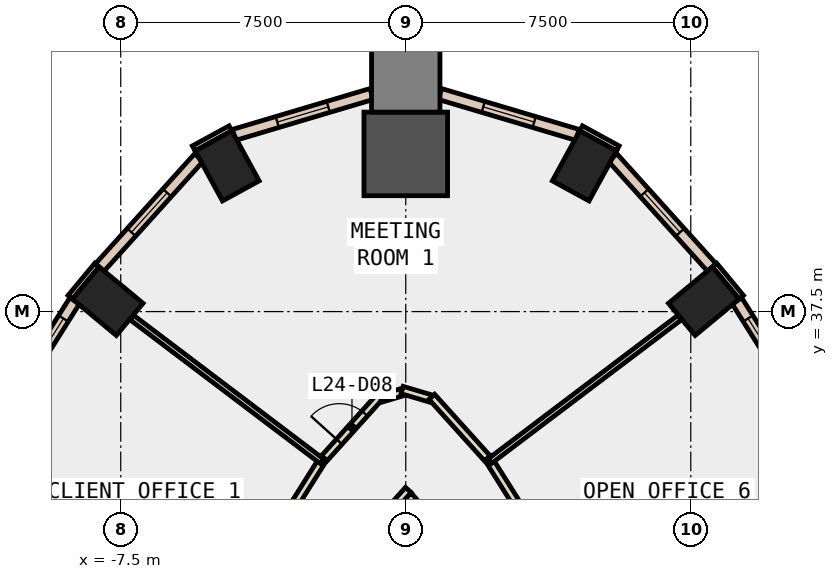
"""IFC4 building model, lengths in metres.
Left out: names, types, materials, properties, quantities, classifications, styles, units other than length and angle.
Written with IfcOpenShell. Run it as: python <this file> out.ifc"""

import sys

from ifc_helpers import new_model, si_unit, direction, frame, frame_2d, origin, origin_2d, place, context, subcontext, project, spatial, rectangle, extrude, element, fill, save


model = new_model("IFC4")
c1 = context("Model", 3, precision=1e-05, world=origin(), true_north=direction((0.0, 1.0)))
c2 = subcontext(c1, "Body", "Model", "MODEL_VIEW")
j1 = project(units=[si_unit("LENGTHUNIT", "METRE"), si_unit("PLANEANGLEUNIT", "RADIAN")], contexts=[c1])
p1 = place(None, origin())
s1 = spatial("IfcSite", under=j1, at=p1, CompositionType="ELEMENT")
p2 = place(p1, origin())
s2 = spatial("IfcBuilding", under=s1, at=p2, CompositionType="ELEMENT")
p3 = place(p2, frame((0.0, 0.0, 111.8)))
s3 = spatial("IfcBuildingStorey", under=s2, at=p3, CompositionType="ELEMENT", Elevation=111.8)
for number, where, z_axis, x_axis in (
    (1, (7.842, 37.774, -0.4), (0.0, 0.0, 1.0), (-0.638, 0.77, 0.0)),
    (2, (4.7, 41.334, -0.4), (0.0, 0.0, 1.0), (-0.877, 0.48, 0.0)),
):
    element("IfcColumn", number, at=place(p3, frame(where, z_axis=z_axis, x_axis=x_axis)), inside=s3, PredefinedType="COLUMN", context=c2, shape_type="SweptSolid", body=[
        extrude(rectangle(XDim=1.1, YDim=1.5, at=origin_2d()), origin(), (0.0, 0.0, 1.0), 4.2),
    ])
p4 = place(p3, frame((0.0, 41.649, -0.4), z_axis=(0.0, 0.0, 1.0), x_axis=(0.0, 1.0, 0.0)))
e3 = element("IfcColumn", 3, at=p4, inside=s3, PredefinedType="COLUMN", context=c2, shape_type="SweptSolid", body=[
    extrude(rectangle(XDim=2.2, YDim=2.2, at=origin_2d()), origin(), (0.0, 0.0, 1.0), 4.2),
])
for number, where, z_axis, x_axis in (
    (4, (-4.7, 41.334, -0.4), (0.0, 0.0, 1.0), (0.877, 0.48, 0.0)),
    (5, (-7.842, 37.774, -0.4), (0.0, 0.0, 1.0), (0.638, 0.77, 0.0)),
):
    element("IfcColumn", number, at=place(p3, frame(where, z_axis=z_axis, x_axis=x_axis)), inside=s3, PredefinedType="COLUMN", context=c2, shape_type="SweptSolid", body=[
        extrude(rectangle(XDim=1.1, YDim=1.5, at=origin_2d()), origin(), (0.0, 0.0, 1.0), 4.2),
    ])
p5 = place(p3, frame((0.0, 43.649, -0.4), z_axis=(0.0, 0.0, 1.0), x_axis=(0.0, 1.0, 0.0)))
e6 = element("IfcColumn", 6, at=p5, inside=s3, PredefinedType="COLUMN", context=c2, shape_type="SweptSolid", body=[
    extrude(rectangle(XDim=1.8, YDim=1.8, at=origin_2d()), origin(), (0.0, 0.0, 1.0), 4.2),
])
for number, where, z_axis, x_axis in (
    (7, (5.579, 41.794, 0.0), (0.0, 0.0, 1.0), (-0.877, 0.48, 0.0)),
    (8, (-4.613, 42.322, 0.0), (0.0, 0.0, 1.0), (-0.877, -0.48, 0.0)),
):
    element("IfcWall", number, at=place(p3, frame(where, z_axis=z_axis, x_axis=x_axis)), inside=s3, PredefinedType="STANDARD", context=c2, shape_type="SweptSolid", body=[
        extrude(rectangle(XDim=1.101, YDim=0.15, at=frame_2d((0.551, 0.0))), origin(), (0.0, 0.0, 1.0), 3.8),
    ])
for number, where, z_axis, x_axis in (
    (9, (8.828, 37.878, 0.0), (0.0, 0.0, 1.0), (-0.638, 0.77, 0.0)),
    (10, (-8.126, 38.724, 0.0), (0.0, 0.0, 1.0), (-0.638, -0.77, 0.0)),
):
    element("IfcWall", number, at=place(p3, frame(where, z_axis=z_axis, x_axis=x_axis)), inside=s3, PredefinedType="STANDARD", context=c2, shape_type="SweptSolid", body=[
        extrude(rectangle(XDim=1.099, YDim=0.15, at=frame_2d((0.55, 0.0))), origin(), (0.0, 0.0, 1.0), 3.8),
    ])
p6 = place(p3, frame((12.018, 32.535, 0.0), z_axis=(0.0, 0.0, 1.0), x_axis=(-0.532699467907, 0.846304482377, 0.0)))
e11 = element("IfcWall", 11, at=p6, inside=s3, PredefinedType="STANDARD", context=c2, shape_type="SweptSolid", body=[
    extrude(rectangle(XDim=6.202, YDim=0.3, at=frame_2d((3.101, 0.0))), origin(), (0.0, 0.0, 1.0), 3.8),
])
p7 = place(p6, frame((0.551, 0.0, 0.9)))
e12 = element("IfcOpeningElement", 12, at=p7, cuts=e11, PredefinedType="OPENING", context=c2, shape_type="SweptSolid", body=[
    extrude(rectangle(XDim=2.0, YDim=2.6, at=frame_2d((1.0, 1.3))), frame((0.0, 0.16, 0.0), z_axis=(0.0, -1.0, 0.0), x_axis=(1.0, 0.0, 0.0)), (0.0, 0.0, 1.0), 0.32),
])
p8 = place(p6, frame((3.652, 0.0, 0.9)))
e13 = element("IfcOpeningElement", 13, at=p8, cuts=e11, PredefinedType="OPENING", context=c2, shape_type="SweptSolid", body=[
    extrude(rectangle(XDim=2.0, YDim=2.6, at=frame_2d((1.0, 1.3))), frame((0.0, 0.16, 0.0), z_axis=(0.0, -1.0, 0.0), x_axis=(1.0, 0.0, 0.0)), (0.0, 0.0, 1.0), 0.32),
])
p9 = place(p3, frame((8.052, 38.661, 0.0), z_axis=(0.0, 0.0, 1.0), x_axis=(-0.66966434159, 0.742663900834, 0.0)))
e14 = element("IfcWall", 14, at=p9, inside=s3, PredefinedType="STANDARD", context=c2, shape_type="SweptSolid", body=[
    extrude(rectangle(XDim=3.893, YDim=0.3, at=frame_2d((1.946, 0.0))), origin(), (0.0, 0.0, 1.0), 3.8),
])
p10 = place(p9, frame((1.246, 0.0, 0.9)))
e15 = element("IfcOpeningElement", 15, at=p10, cuts=e14, PredefinedType="OPENING", context=c2, shape_type="SweptSolid", body=[
    extrude(rectangle(XDim=1.4, YDim=2.6, at=frame_2d((0.7, 1.3))), frame((0.0, 0.16, 0.0), z_axis=(0.0, -1.0, 0.0), x_axis=(1.0, 0.0, 0.0)), (0.0, 0.0, 1.0), 0.32),
])
p11 = place(p3, frame((4.52, 42.149, 0.0), z_axis=(0.0, 0.0, 1.0), x_axis=(-0.958563070772, 0.284880394819, 0.0)))
e16 = element("IfcWall", 16, at=p11, inside=s3, PredefinedType="STANDARD", context=c2, shape_type="SweptSolid", body=[
    extrude(rectangle(XDim=3.778, YDim=0.3, at=frame_2d((1.889, 0.0))), origin(), (0.0, 0.0, 1.0), 3.8),
])
p12 = place(p11, frame((1.189, 0.0, 0.9)))
e17 = element("IfcOpeningElement", 17, at=p12, cuts=e16, PredefinedType="OPENING", context=c2, shape_type="SweptSolid", body=[
    extrude(rectangle(XDim=1.4, YDim=2.6, at=frame_2d((0.7, 1.3))), frame((0.0, 0.16, 0.0), z_axis=(0.0, -1.0, 0.0), x_axis=(1.0, 0.0, 0.0)), (0.0, 0.0, 1.0), 0.32),
])
p13 = place(p3, frame((-0.899, 43.225, 0.0), z_axis=(0.0, 0.0, 1.0), x_axis=(-0.958563070772, -0.284880394819, 0.0)))
e18 = element("IfcWall", 18, at=p13, inside=s3, PredefinedType="STANDARD", context=c2, shape_type="SweptSolid", body=[
    extrude(rectangle(XDim=3.778, YDim=0.3, at=frame_2d((1.889, 0.0))), origin(), (0.0, 0.0, 1.0), 3.8),
])
p14 = place(p13, frame((1.189, 0.0, 0.9)))
e19 = element("IfcOpeningElement", 19, at=p14, cuts=e18, PredefinedType="OPENING", context=c2, shape_type="SweptSolid", body=[
    extrude(rectangle(XDim=1.4, YDim=2.6, at=frame_2d((0.7, 1.3))), frame((0.0, 0.16, 0.0), z_axis=(0.0, -1.0, 0.0), x_axis=(1.0, 0.0, 0.0)), (0.0, 0.0, 1.0), 0.32),
])
p15 = place(p3, frame((-5.445, 41.552, 0.0), z_axis=(0.0, 0.0, 1.0), x_axis=(-0.66966434159, -0.742663900834, 0.0)))
e20 = element("IfcWall", 20, at=p15, inside=s3, PredefinedType="STANDARD", context=c2, shape_type="SweptSolid", body=[
    extrude(rectangle(XDim=3.893, YDim=0.3, at=frame_2d((1.946, 0.0))), origin(), (0.0, 0.0, 1.0), 3.8),
])
p16 = place(p15, frame((1.246, 0.0, 0.9)))
e21 = element("IfcOpeningElement", 21, at=p16, cuts=e20, PredefinedType="OPENING", context=c2, shape_type="SweptSolid", body=[
    extrude(rectangle(XDim=1.4, YDim=2.6, at=frame_2d((0.7, 1.3))), frame((0.0, 0.16, 0.0), z_axis=(0.0, -1.0, 0.0), x_axis=(1.0, 0.0, 0.0)), (0.0, 0.0, 1.0), 0.32),
])
p17 = place(p3, frame((-8.714, 37.784, 0.0), z_axis=(0.0, 0.0, 1.0), x_axis=(-0.532699467907, -0.846304482377, 0.0)))
e22 = element("IfcWall", 22, at=p17, inside=s3, PredefinedType="STANDARD", context=c2, shape_type="SweptSolid", body=[
    extrude(rectangle(XDim=6.202, YDim=0.3, at=frame_2d((3.101, 0.0))), origin(), (0.0, 0.0, 1.0), 3.8),
])
p18 = place(p17, frame((0.551, 0.0, 0.9)))
e23 = element("IfcOpeningElement", 23, at=p18, cuts=e22, PredefinedType="OPENING", context=c2, shape_type="SweptSolid", body=[
    extrude(rectangle(XDim=2.0, YDim=2.6, at=frame_2d((1.0, 1.3))), frame((0.0, 0.16, 0.0), z_axis=(0.0, -1.0, 0.0), x_axis=(1.0, 0.0, 0.0)), (0.0, 0.0, 1.0), 0.32),
])
p19 = place(p17, frame((3.652, 0.0, 0.9)))
e24 = element("IfcOpeningElement", 24, at=p19, cuts=e22, PredefinedType="OPENING", context=c2, shape_type="SweptSolid", body=[
    extrude(rectangle(XDim=2.0, YDim=2.6, at=frame_2d((1.0, 1.3))), frame((0.0, 0.16, 0.0), z_axis=(0.0, -1.0, 0.0), x_axis=(1.0, 0.0, 0.0)), (0.0, 0.0, 1.0), 0.32),
])
p20 = place(p3, frame((0.384, 32.306, 0.0), z_axis=(0.0, 0.0, 1.0), x_axis=(-0.669306261406, 0.742986627365, 0.0)))
e25 = element("IfcWall", 25, at=p20, inside=s3, PredefinedType="PARTITIONING", context=c2, shape_type="SweptSolid", body=[
    extrude(rectangle(XDim=0.474, YDim=0.2, at=frame_2d((0.237, 0.0))), origin(), (0.0, 0.0, 1.0), 3.8),
])
p21 = place(p3, frame((0.067, 32.807, 0.0), z_axis=(0.0, 0.0, 1.0), x_axis=(-0.66900475403, -0.74325812413, 0.0)))
e26 = element("IfcWall", 26, at=p21, inside=s3, PredefinedType="PARTITIONING", context=c2, shape_type="SweptSolid", body=[
    extrude(rectangle(XDim=0.674, YDim=0.2, at=frame_2d((0.337, 0.0))), origin(), (0.0, 0.0, 1.0), 3.8),
])
p22 = place(p3, frame((2.159, 33.649, 0.0), z_axis=(0.0, 0.0, 1.0), x_axis=(0.532784927572, -0.846250684462, 0.0)))
e27 = element("IfcWall", 27, at=p22, inside=s3, PredefinedType="PARTITIONING", context=c2, shape_type="SweptSolid", body=[
    extrude(rectangle(XDim=6.626, YDim=0.2, at=frame_2d((3.313, 0.0))), origin(), (0.0, 0.0, 1.0), 3.8),
])
p23 = place(p22, frame((2.888, 0.0, 0.0)))
e28 = element("IfcOpeningElement", 28, at=p23, cuts=e27, PredefinedType="OPENING", context=c2, shape_type="SweptSolid", body=[
    extrude(rectangle(XDim=1.0, YDim=2.1, at=frame_2d((0.5, 1.05))), frame((0.0, 0.11, 0.0), z_axis=(0.0, -1.0, 0.0), x_axis=(1.0, 0.0, 0.0)), (0.0, 0.0, 1.0), 0.22),
])
p24 = place(p3, frame((-2.145, 33.639, 0.0), z_axis=(0.0, 0.0, 1.0), x_axis=(0.66965737341, 0.742670184023, 0.0)))
e29 = element("IfcWall", 29, at=p24, inside=s3, PredefinedType="PARTITIONING", context=c2, shape_type="SweptSolid", body=[
    extrude(rectangle(XDim=2.18, YDim=0.2, at=frame_2d((1.09, 0.0))), origin(), (0.0, 0.0, 1.0), 3.8),
])
p25 = place(p24, frame((0.59, 0.0, 0.0)))
e30 = element("IfcOpeningElement", 30, at=p25, cuts=e29, PredefinedType="OPENING", context=c2, shape_type="SweptSolid", body=[
    extrude(rectangle(XDim=1.0, YDim=2.1, at=frame_2d((0.5, 1.05))), frame((0.0, 0.11, 0.0), z_axis=(0.0, -1.0, 0.0), x_axis=(1.0, 0.0, 0.0)), (0.0, 0.0, 1.0), 0.22),
])
p26 = place(p3, frame((-0.656, 35.213, 0.0), z_axis=(0.0, 0.0, 1.0), x_axis=(0.958764375257, 0.284202168777, 0.0)))
e31 = element("IfcWall", 31, at=p26, inside=s3, PredefinedType="PARTITIONING", context=c2, shape_type="SweptSolid", body=[
    extrude(rectangle(XDim=0.584, YDim=0.2, at=frame_2d((0.292, 0.0))), origin(), (0.0, 0.0, 1.0), 3.8),
])
p27 = place(p3, frame((-0.096, 35.436, 0.0), z_axis=(0.0, 0.0, 1.0), x_axis=(0.95867870552, -0.284491018456, 0.0)))
e32 = element("IfcWall", 32, at=p27, inside=s3, PredefinedType="PARTITIONING", context=c2, shape_type="SweptSolid", body=[
    extrude(rectangle(XDim=0.784, YDim=0.2, at=frame_2d((0.392, 0.0))), origin(), (0.0, 0.0, 1.0), 3.8),
])
p28 = place(p3, frame((0.685, 35.258, 0.0), z_axis=(0.0, 0.0, 1.0), x_axis=(0.66965737341, -0.742670184023, 0.0)))
e33 = element("IfcWall", 33, at=p28, inside=s3, PredefinedType="PARTITIONING", context=c2, shape_type="SweptSolid", body=[
    extrude(rectangle(XDim=2.18, YDim=0.2, at=frame_2d((1.09, 0.0))), origin(), (0.0, 0.0, 1.0), 3.8),
])
p29 = place(p3, frame((-5.769, 27.915, 0.0), z_axis=(0.0, 0.0, 1.0), x_axis=(0.532800846123, 0.846240662206, 0.0)))
e34 = element("IfcWall", 34, at=p29, inside=s3, PredefinedType="PARTITIONING", context=c2, shape_type="SweptSolid", body=[
    extrude(rectangle(XDim=6.776, YDim=0.2, at=frame_2d((3.388, 0.0))), origin(), (0.0, 0.0, 1.0), 3.8),
])
p30 = place(p29, frame((2.888, 0.0, 0.0)))
e35 = element("IfcOpeningElement", 35, at=p30, cuts=e34, PredefinedType="OPENING", context=c2, shape_type="SweptSolid", body=[
    extrude(rectangle(XDim=1.0, YDim=2.1, at=frame_2d((0.5, 1.05))), frame((0.0, 0.11, 0.0), z_axis=(0.0, -1.0, 0.0), x_axis=(1.0, 0.0, 0.0)), (0.0, 0.0, 1.0), 0.22),
])
for number, where, z_axis, x_axis in (
    (36, (2.212, 33.565, 0.0), (0.0, 0.0, 1.0), (0.797, 0.603, 0.0)),
    (37, (-2.212, 33.565, 0.0), (0.0, 0.0, 1.0), (-0.797, 0.603, 0.0)),
):
    element("IfcWall", number, at=place(p3, frame(where, z_axis=z_axis, x_axis=x_axis)), inside=s3, PredefinedType="PARTITIONING", context=c2, shape_type="SweptSolid", body=[
        extrude(rectangle(XDim=6.257, YDim=0.15, at=frame_2d((3.128, 0.0))), origin(), (0.0, 0.0, 1.0), 3.8),
    ])
p31 = place(p8, origin())
e38 = element("IfcWindow", 38, at=p31, inside=s3, PartitioningType="SINGLE_PANEL", PredefinedType="WINDOW", context=c2, shape_type="SweptSolid", body=[
    extrude(rectangle(XDim=2.0, YDim=2.6, at=frame_2d((1.0, 1.3))), frame((0.0, 0.03, 0.0), z_axis=(0.0, -1.0, 0.0), x_axis=(1.0, 0.0, 0.0)), (0.0, 0.0, 1.0), 0.06),
])
fill(e13, e38)
p32 = place(p10, origin())
e39 = element("IfcWindow", 39, at=p32, inside=s3, PartitioningType="SINGLE_PANEL", PredefinedType="WINDOW", context=c2, shape_type="SweptSolid", body=[
    extrude(rectangle(XDim=1.4, YDim=2.6, at=frame_2d((0.7, 1.3))), frame((0.0, 0.03, 0.0), z_axis=(0.0, -1.0, 0.0), x_axis=(1.0, 0.0, 0.0)), (0.0, 0.0, 1.0), 0.06),
])
fill(e15, e39)
p33 = place(p12, origin())
e40 = element("IfcWindow", 40, at=p33, inside=s3, PartitioningType="SINGLE_PANEL", PredefinedType="WINDOW", context=c2, shape_type="SweptSolid", body=[
    extrude(rectangle(XDim=1.4, YDim=2.6, at=frame_2d((0.7, 1.3))), frame((0.0, 0.03, 0.0), z_axis=(0.0, -1.0, 0.0), x_axis=(1.0, 0.0, 0.0)), (0.0, 0.0, 1.0), 0.06),
])
fill(e17, e40)
p34 = place(p14, origin())
e41 = element("IfcWindow", 41, at=p34, inside=s3, PartitioningType="SINGLE_PANEL", PredefinedType="WINDOW", context=c2, shape_type="SweptSolid", body=[
    extrude(rectangle(XDim=1.4, YDim=2.6, at=frame_2d((0.7, 1.3))), frame((0.0, 0.03, 0.0), z_axis=(0.0, -1.0, 0.0), x_axis=(1.0, 0.0, 0.0)), (0.0, 0.0, 1.0), 0.06),
])
fill(e19, e41)
p35 = place(p16, origin())
e42 = element("IfcWindow", 42, at=p35, inside=s3, PartitioningType="SINGLE_PANEL", PredefinedType="WINDOW", context=c2, shape_type="SweptSolid", body=[
    extrude(rectangle(XDim=1.4, YDim=2.6, at=frame_2d((0.7, 1.3))), frame((0.0, 0.03, 0.0), z_axis=(0.0, -1.0, 0.0), x_axis=(1.0, 0.0, 0.0)), (0.0, 0.0, 1.0), 0.06),
])
fill(e21, e42)
p36 = place(p18, origin())
e43 = element("IfcWindow", 43, at=p36, inside=s3, PartitioningType="SINGLE_PANEL", PredefinedType="WINDOW", context=c2, shape_type="SweptSolid", body=[
    extrude(rectangle(XDim=2.0, YDim=2.6, at=frame_2d((1.0, 1.3))), frame((0.0, 0.03, 0.0), z_axis=(0.0, -1.0, 0.0), x_axis=(1.0, 0.0, 0.0)), (0.0, 0.0, 1.0), 0.06),
])
fill(e23, e43)
p37 = place(p25, origin())
e44 = element("IfcDoor", 44, at=p37, inside=s3, OperationType="SINGLE_SWING_LEFT", PredefinedType="DOOR", context=c2, shape_type="SweptSolid", body=[
    extrude(rectangle(XDim=1.0, YDim=2.1, at=frame_2d((0.5, 1.05))), frame((0.0, 0.025, 0.0), z_axis=(0.0, -1.0, 0.0), x_axis=(1.0, 0.0, 0.0)), (0.0, 0.0, 1.0), 0.05),
])
fill(e30, e44)
save(model, sys.argv[1])
